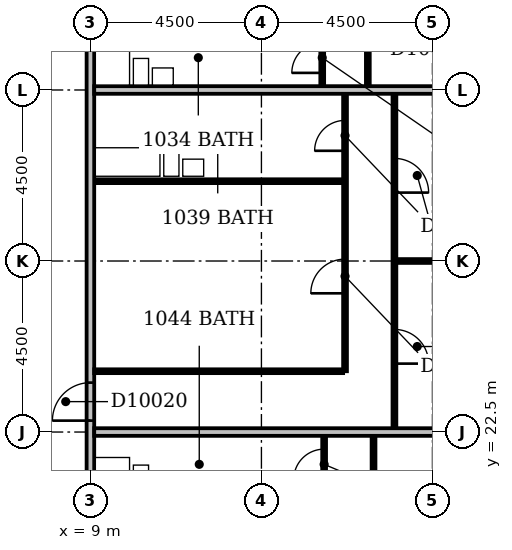
"""IFC4 building model, lengths in metres.
Left out: names, types, materials, properties, quantities, classifications, styles, units other than length and angle.
Written with IfcOpenShell. Run it as: python <this file> out.ifc"""

import sys

from ifc_helpers import new_model, si_unit, direction, frame, frame_2d, origin, place, context, subcontext, project, spatial, rectangle, extrude, element, fill, save


model = new_model("IFC4")
c1 = context("Model", 3, precision=1e-05, world=origin(), true_north=direction((0.0, 1.0)))
c2 = subcontext(c1, "Body", "Model", "MODEL_VIEW")
j1 = project(units=[si_unit("LENGTHUNIT", "METRE"), si_unit("PLANEANGLEUNIT", "RADIAN")], contexts=[c1])
p1 = place(None, origin())
s1 = spatial("IfcSite", under=j1, at=p1, CompositionType="ELEMENT")
p2 = place(p1, origin())
s2 = spatial("IfcBuilding", under=s1, at=p2, CompositionType="ELEMENT")
p3 = place(p2, frame((0.0, 0.0, 47.0)))
s3 = spatial("IfcBuildingStorey", under=s2, at=p3, CompositionType="ELEMENT", Elevation=47.0)
p4 = place(p3, frame((9.0, 5.0, 0.0), z_axis=(0.0, 0.0, 1.0), x_axis=(0.0, 1.0, 0.0)))
e1 = element("IfcWall", 1, at=p4, inside=s3, PredefinedType="PARTITIONING", context=c2, shape_type="SweptSolid", body=[
    extrude(rectangle(XDim=44.5, YDim=0.2, at=frame_2d((22.25, 0.0))), origin(), (0.0, 0.0, 1.0), 3.3),
])
p5 = place(p4, frame((28.45, 0.0, 0.0)))
e2 = element("IfcOpeningElement", 2, at=p5, cuts=e1, PredefinedType="OPENING", context=c2, shape_type="SweptSolid", body=[
    extrude(rectangle(XDim=1.0, YDim=2.1, at=frame_2d((0.5, 1.05))), frame((0.0, 0.112, 0.0), z_axis=(0.0, -1.0, 0.0), x_axis=(1.0, 0.0, 0.0)), (0.0, 0.0, 1.0), 0.224),
])
p6 = place(p4, frame((17.8, 0.0, 0.0)))
e3 = element("IfcOpeningElement", 3, at=p6, cuts=e1, PredefinedType="OPENING", context=c2, shape_type="SweptSolid", body=[
    extrude(rectangle(XDim=1.0, YDim=2.1, at=frame_2d((0.5, 1.05))), frame((0.0, 0.112, 0.0), z_axis=(0.0, -1.0, 0.0), x_axis=(1.0, 0.0, 0.0)), (0.0, 0.0, 1.0), 0.224),
])
p7 = place(p4, frame((14.55, 0.0, 0.0)))
e4 = element("IfcOpeningElement", 4, at=p7, cuts=e1, PredefinedType="OPENING", context=c2, shape_type="SweptSolid", body=[
    extrude(rectangle(XDim=1.0, YDim=2.1, at=frame_2d((0.5, 1.05))), frame((0.0, 0.112, 0.0), z_axis=(0.0, -1.0, 0.0), x_axis=(1.0, 0.0, 0.0)), (0.0, 0.0, 1.0), 0.224),
])
p8 = place(p4, frame((11.7, 0.0, 0.0)))
e5 = element("IfcOpeningElement", 5, at=p8, cuts=e1, PredefinedType="OPENING", context=c2, shape_type="SweptSolid", body=[
    extrude(rectangle(XDim=1.0, YDim=2.1, at=frame_2d((0.5, 1.05))), frame((0.0, 0.112, 0.0), z_axis=(0.0, -1.0, 0.0), x_axis=(1.0, 0.0, 0.0)), (0.0, 0.0, 1.0), 0.224),
])
p9 = place(p4, frame((35.0, 0.0, 0.0)))
e6 = element("IfcOpeningElement", 6, at=p9, cuts=e1, PredefinedType="OPENING", context=c2, shape_type="SweptSolid", body=[
    extrude(rectangle(XDim=0.9, YDim=2.1, at=frame_2d((0.45, 1.05))), frame((0.0, 0.112, 0.0), z_axis=(0.0, -1.0, 0.0), x_axis=(1.0, 0.0, 0.0)), (0.0, 0.0, 1.0), 0.224),
])
p10 = place(p4, frame((1.5, 0.0, 0.0)))
e7 = element("IfcOpeningElement", 7, at=p10, cuts=e1, PredefinedType="OPENING", context=c2, shape_type="SweptSolid", body=[
    extrude(rectangle(XDim=0.9, YDim=2.1, at=frame_2d((0.45, 1.05))), frame((0.0, 0.112, 0.0), z_axis=(0.0, -1.0, 0.0), x_axis=(1.0, 0.0, 0.0)), (0.0, 0.0, 1.0), 0.224),
])
p11 = place(p3, frame((16.45, 18.1, 0.0), z_axis=(0.0, 0.0, 1.0), x_axis=(0.0, 1.0, 0.0)))
e8 = element("IfcWall", 8, at=p11, inside=s3, PredefinedType="PARTITIONING", context=c2, shape_type="SweptSolid", body=[
    extrude(rectangle(XDim=4.3, YDim=0.1, at=frame_2d((2.15, 0.0))), origin(), (0.0, 0.0, 1.0), 3.3),
])
p12 = place(p11, frame((1.7, 0.0, 0.0)))
e9 = element("IfcOpeningElement", 9, at=p12, cuts=e8, PredefinedType="OPENING", context=c2, shape_type="SweptSolid", body=[
    extrude(rectangle(XDim=0.9, YDim=2.1, at=frame_2d((0.45, 1.05))), frame((0.0, 0.062, 0.0), z_axis=(0.0, -1.0, 0.0), x_axis=(1.0, 0.0, 0.0)), (0.0, 0.0, 1.0), 0.124),
])
p13 = place(p3, frame((15.15, 20.8, 0.0), z_axis=(0.0, 0.0, 1.0), x_axis=(0.0, 1.0, 0.0)))
e10 = element("IfcWall", 10, at=p13, inside=s3, PredefinedType="PARTITIONING", context=c2, shape_type="SweptSolid", body=[
    extrude(rectangle(XDim=1.6, YDim=0.1, at=frame_2d((0.8, 0.0))), origin(), (0.0, 0.0, 1.0), 3.3),
])
p14 = place(p13, frame((0.45, 0.0, 0.0)))
e11 = element("IfcOpeningElement", 11, at=p14, cuts=e10, PredefinedType="OPENING", context=c2, shape_type="SweptSolid", body=[
    extrude(rectangle(XDim=0.8, YDim=2.1, at=frame_2d((0.4, 1.05))), frame((0.0, 0.062, 0.0), z_axis=(0.0, -1.0, 0.0), x_axis=(1.0, 0.0, 0.0)), (0.0, 0.0, 1.0), 0.124),
])
p15 = place(p3, frame((9.1, 22.5, 0.0), z_axis=(0.0, 0.0, 1.0), x_axis=(1.0, 0.0, 0.0)))
e12 = element("IfcWall", 12, at=p15, inside=s3, PredefinedType="PARTITIONING", context=c2, shape_type="SweptSolid", body=[
    extrude(rectangle(XDim=12.8, YDim=0.2, at=frame_2d((6.4, 0.0))), origin(), (0.0, 0.0, 1.0), 3.3),
])
p16 = place(p3, frame((17.0, 22.6, 0.0), z_axis=(0.0, 0.0, 1.0), x_axis=(0.0, 1.0, 0.0)))
e13 = element("IfcWall", 13, at=p16, inside=s3, PredefinedType="PARTITIONING", context=c2, shape_type="SweptSolid", body=[
    extrude(rectangle(XDim=8.8, YDim=0.1, at=frame_2d((4.4, 0.0))), origin(), (0.0, 0.0, 1.0), 3.3),
])
p17 = place(p16, frame((1.7, 0.0, 0.0)))
e14 = element("IfcOpeningElement", 14, at=p17, cuts=e13, PredefinedType="OPENING", context=c2, shape_type="SweptSolid", body=[
    extrude(rectangle(XDim=0.9, YDim=2.1, at=frame_2d((0.45, 1.05))), frame((0.0, 0.062, 0.0), z_axis=(0.0, -1.0, 0.0), x_axis=(1.0, 0.0, 0.0)), (0.0, 0.0, 1.0), 0.124),
])
p18 = place(p16, frame((6.2, 0.0, 0.0)))
e15 = element("IfcOpeningElement", 15, at=p18, cuts=e13, PredefinedType="OPENING", context=c2, shape_type="SweptSolid", body=[
    extrude(rectangle(XDim=0.9, YDim=2.1, at=frame_2d((0.45, 1.05))), frame((0.0, 0.062, 0.0), z_axis=(0.0, -1.0, 0.0), x_axis=(1.0, 0.0, 0.0)), (0.0, 0.0, 1.0), 0.124),
])
p19 = place(p3, frame((9.1, 24.1, 0.0), z_axis=(0.0, 0.0, 1.0), x_axis=(1.0, 0.0, 0.0)))
e16 = element("IfcWall", 16, at=p19, inside=s3, PredefinedType="PARTITIONING", context=c2, shape_type="SweptSolid", body=[
    extrude(rectangle(XDim=6.55, YDim=0.1, at=frame_2d((3.275, 0.0))), origin(), (0.0, 0.0, 1.0), 3.3),
])
p20 = place(p3, frame((15.7, 24.1, 0.0), z_axis=(0.0, 0.0, 1.0), x_axis=(0.0, 1.0, 0.0)))
e17 = element("IfcWall", 17, at=p20, inside=s3, PredefinedType="PARTITIONING", context=c2, shape_type="SweptSolid", body=[
    extrude(rectangle(XDim=7.3, YDim=0.1, at=frame_2d((3.65, 0.0))), origin(), (0.0, 0.0, 1.0), 3.3),
])
p21 = place(p20, frame((5.8, 0.0, 0.0)))
e18 = element("IfcOpeningElement", 18, at=p21, cuts=e17, PredefinedType="OPENING", context=c2, shape_type="SweptSolid", body=[
    extrude(rectangle(XDim=0.8, YDim=2.1, at=frame_2d((0.4, 1.05))), frame((0.0, 0.062, 0.0), z_axis=(0.0, -1.0, 0.0), x_axis=(1.0, 0.0, 0.0)), (0.0, 0.0, 1.0), 0.124),
])
p22 = place(p20, frame((2.05, 0.0, 0.0)))
e19 = element("IfcOpeningElement", 19, at=p22, cuts=e17, PredefinedType="OPENING", context=c2, shape_type="SweptSolid", body=[
    extrude(rectangle(XDim=0.9, YDim=2.1, at=frame_2d((0.45, 1.05))), frame((0.0, 0.062, 0.0), z_axis=(0.0, -1.0, 0.0), x_axis=(1.0, 0.0, 0.0)), (0.0, 0.0, 1.0), 0.124),
])
p23 = place(p3, frame((17.05, 27.0, 0.0), z_axis=(0.0, 0.0, 1.0), x_axis=(1.0, 0.0, 0.0)))
e20 = element("IfcWall", 20, at=p23, inside=s3, PredefinedType="PARTITIONING", context=c2, shape_type="SweptSolid", body=[
    extrude(rectangle(XDim=4.85, YDim=0.1, at=frame_2d((2.425, 0.0))), origin(), (0.0, 0.0, 1.0), 2.7),
])
p24 = place(p3, frame((9.1, 29.1, 0.0), z_axis=(0.0, 0.0, 1.0), x_axis=(1.0, 0.0, 0.0)))
e21 = element("IfcWall", 21, at=p24, inside=s3, PredefinedType="PLUMBINGWALL", context=c2, shape_type="SweptSolid", body=[
    extrude(rectangle(XDim=6.55, YDim=0.1, at=frame_2d((3.275, 0.0))), origin(), (0.0, 0.0, 1.0), 3.3),
])
p25 = place(p3, frame((9.1, 31.5, 0.0), z_axis=(0.0, 0.0, 1.0), x_axis=(1.0, 0.0, 0.0)))
e22 = element("IfcWall", 22, at=p25, inside=s3, PredefinedType="PARTITIONING", context=c2, shape_type="SweptSolid", body=[
    extrude(rectangle(XDim=12.8, YDim=0.2, at=frame_2d((6.4, 0.0))), origin(), (0.0, 0.0, 1.0), 3.3),
])
p26 = place(p3, frame((15.1, 31.6, 0.0), z_axis=(0.0, 0.0, 1.0), x_axis=(0.0, 1.0, 0.0)))
e23 = element("IfcWall", 23, at=p26, inside=s3, PredefinedType="PARTITIONING", context=c2, shape_type="SweptSolid", body=[
    extrude(rectangle(XDim=1.6, YDim=0.1, at=frame_2d((0.8, 0.0))), origin(), (0.0, 0.0, 1.0), 3.3),
])
p27 = place(p26, frame((0.35, 0.0, 0.0)))
e24 = element("IfcOpeningElement", 24, at=p27, cuts=e23, PredefinedType="OPENING", context=c2, shape_type="SweptSolid", body=[
    extrude(rectangle(XDim=0.8, YDim=2.1, at=frame_2d((0.4, 1.05))), frame((0.0, 0.062, 0.0), z_axis=(0.0, -1.0, 0.0), x_axis=(1.0, 0.0, 0.0)), (0.0, 0.0, 1.0), 0.124),
])
p28 = place(p3, frame((16.3, 31.6, 0.0), z_axis=(0.0, 0.0, 1.0), x_axis=(0.0, 1.0, 0.0)))
e25 = element("IfcWall", 25, at=p28, inside=s3, PredefinedType="PARTITIONING", context=c2, shape_type="SweptSolid", body=[
    extrude(rectangle(XDim=4.3, YDim=0.1, at=frame_2d((2.15, 0.0))), origin(), (0.0, 0.0, 1.0), 3.3),
])
p29 = place(p28, frame((1.7, 0.0, 0.0)))
e26 = element("IfcOpeningElement", 26, at=p29, cuts=e25, PredefinedType="OPENING", context=c2, shape_type="SweptSolid", body=[
    extrude(rectangle(XDim=0.9, YDim=2.1, at=frame_2d((0.45, 1.05))), frame((0.0, 0.062, 0.0), z_axis=(0.0, -1.0, 0.0), x_axis=(1.0, 0.0, 0.0)), (0.0, 0.0, 1.0), 0.124),
])
p30 = place(p6, origin())
e27 = element("IfcDoor", 27, at=p30, inside=s3, OperationType="SINGLE_SWING_LEFT", PredefinedType="DOOR", context=c2, shape_type="SweptSolid", body=[
    extrude(rectangle(XDim=1.0, YDim=2.1, at=frame_2d((0.5, 1.05))), frame((0.0, 0.025, 0.0), z_axis=(0.0, -1.0, 0.0), x_axis=(1.0, 0.0, 0.0)), (0.0, 0.0, 1.0), 0.05),
])
fill(e3, e27)
p31 = place(p14, origin())
e28 = element("IfcDoor", 28, at=p31, inside=s3, OperationType="SINGLE_SWING_LEFT", PredefinedType="DOOR", context=c2, shape_type="SweptSolid", body=[
    extrude(rectangle(XDim=0.8, YDim=2.1, at=frame_2d((0.4, 1.05))), frame((0.0, 0.025, 0.0), z_axis=(0.0, -1.0, 0.0), x_axis=(1.0, 0.0, 0.0)), (0.0, 0.0, 1.0), 0.05),
])
fill(e11, e28)
p32 = place(p17, frame((0.9, 0.0, 0.0), z_axis=(0.0, 0.0, 1.0), x_axis=(-1.0, 0.0, 0.0)))
e29 = element("IfcDoor", 29, at=p32, inside=s3, OperationType="SINGLE_SWING_RIGHT", PredefinedType="DOOR", context=c2, shape_type="SweptSolid", body=[
    extrude(rectangle(XDim=0.9, YDim=2.1, at=frame_2d((0.45, 1.05))), frame((0.0, 0.025, 0.0), z_axis=(0.0, -1.0, 0.0), x_axis=(1.0, 0.0, 0.0)), (0.0, 0.0, 1.0), 0.05),
])
fill(e14, e29)
p33 = place(p18, frame((0.9, 0.0, 0.0), z_axis=(0.0, 0.0, 1.0), x_axis=(-1.0, 0.0, 0.0)))
e30 = element("IfcDoor", 30, at=p33, inside=s3, OperationType="SINGLE_SWING_RIGHT", PredefinedType="DOOR", context=c2, shape_type="SweptSolid", body=[
    extrude(rectangle(XDim=0.9, YDim=2.1, at=frame_2d((0.45, 1.05))), frame((0.0, 0.025, 0.0), z_axis=(0.0, -1.0, 0.0), x_axis=(1.0, 0.0, 0.0)), (0.0, 0.0, 1.0), 0.05),
])
fill(e15, e30)
p34 = place(p21, origin())
e31 = element("IfcDoor", 31, at=p34, inside=s3, OperationType="SINGLE_SWING_LEFT", PredefinedType="DOOR", context=c2, shape_type="SweptSolid", body=[
    extrude(rectangle(XDim=0.8, YDim=2.1, at=frame_2d((0.4, 1.05))), frame((0.0, 0.025, 0.0), z_axis=(0.0, -1.0, 0.0), x_axis=(1.0, 0.0, 0.0)), (0.0, 0.0, 1.0), 0.05),
])
fill(e18, e31)
p35 = place(p22, origin())
e32 = element("IfcDoor", 32, at=p35, inside=s3, OperationType="SINGLE_SWING_LEFT", PredefinedType="DOOR", context=c2, shape_type="SweptSolid", body=[
    extrude(rectangle(XDim=0.9, YDim=2.1, at=frame_2d((0.45, 1.05))), frame((0.0, 0.025, 0.0), z_axis=(0.0, -1.0, 0.0), x_axis=(1.0, 0.0, 0.0)), (0.0, 0.0, 1.0), 0.05),
])
fill(e19, e32)
p36 = place(p27, origin())
e33 = element("IfcDoor", 33, at=p36, inside=s3, OperationType="SINGLE_SWING_LEFT", PredefinedType="DOOR", context=c2, shape_type="SweptSolid", body=[
    extrude(rectangle(XDim=0.8, YDim=2.1, at=frame_2d((0.4, 1.05))), frame((0.0, 0.025, 0.0), z_axis=(0.0, -1.0, 0.0), x_axis=(1.0, 0.0, 0.0)), (0.0, 0.0, 1.0), 0.05),
])
fill(e24, e33)
save(model, sys.argv[1])
